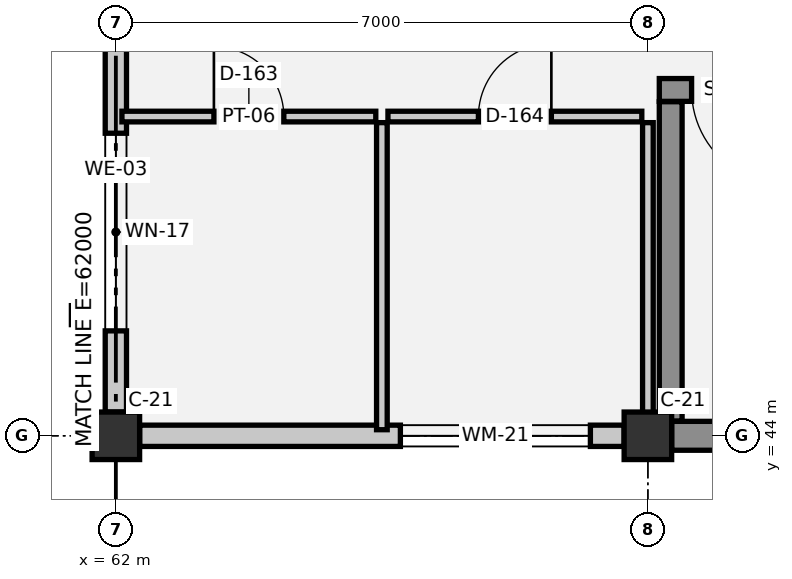
"""IFC4 building model, lengths in metres.
Left out: names, types, materials, properties, quantities, classifications, styles, units other than length and angle.
Written with IfcOpenShell. Run it as: python <this file> out.ifc"""

import sys

from ifc_helpers import new_model, si_unit, direction, frame, frame_2d, origin, origin_2d, place, context, subcontext, project, spatial, rectangle, extrude, element, fill, save


model = new_model("IFC4")
c1 = context("Model", 3, precision=1e-05, world=origin(), true_north=direction((0.0, 1.0)))
c2 = subcontext(c1, "Body", "Model", "MODEL_VIEW")
j1 = project(units=[si_unit("LENGTHUNIT", "METRE"), si_unit("PLANEANGLEUNIT", "RADIAN")], contexts=[c1])
p1 = place(None, origin())
s1 = spatial("IfcSite", under=j1, at=p1, CompositionType="ELEMENT")
p2 = place(p1, origin())
s2 = spatial("IfcBuilding", under=s1, at=p2, CompositionType="ELEMENT")
p3 = place(p2, frame((0.0, 0.0, 22.05)))
s3 = spatial("IfcBuildingStorey", under=s2, at=p3, CompositionType="ELEMENT", Elevation=22.05)
for number, where, z_axis, x_axis in (
    (1, (62.0, 44.0, 0.0), (0.0, 0.0, 1.0), (1.0, 0.0, 0.0)),
    (2, (69.0, 44.0, 0.0), (0.0, 0.0, 1.0), (1.0, 0.0, 0.0)),
):
    element("IfcColumn", number, at=place(p3, frame(where, z_axis=z_axis, x_axis=x_axis)), inside=s3, PredefinedType="COLUMN", context=c2, shape_type="SweptSolid", body=[
        extrude(rectangle(XDim=0.625, YDim=0.625, at=origin_2d()), origin(), (0.0, 0.0, 1.0), 3.75),
    ])
p4 = place(p3, frame((62.0, 44.312, 0.0), z_axis=(0.0, 0.0, 1.0), x_axis=(0.0, 1.0, 0.0)))
e3 = element("IfcWall", 3, at=p4, inside=s3, PredefinedType="SOLIDWALL", context=c2, shape_type="SweptSolid", body=[
    extrude(rectangle(XDim=6.375, YDim=0.28, at=frame_2d((3.188, 0.0))), origin(), (0.0, 0.0, 1.0), 2.56),
])
p5 = place(p4, frame((1.068, 0.0, 1.0)))
e4 = element("IfcOpeningElement", 4, at=p5, cuts=e3, PredefinedType="OPENING", context=c2, shape_type="SweptSolid", body=[
    extrude(rectangle(XDim=2.6, YDim=1.1, at=frame_2d((1.3, 0.55))), frame((0.0, 0.15, 0.0), z_axis=(0.0, -1.0, 0.0), x_axis=(1.0, 0.0, 0.0)), (0.0, 0.0, 1.0), 0.3),
])
p6 = place(p3, frame((76.688, 44.0, 0.0), z_axis=(0.0, 0.0, 1.0), x_axis=(-1.0, 0.0, 0.0)))
e5 = element("IfcWall", 5, at=p6, inside=s3, PredefinedType="STANDARD", context=c2, shape_type="SweptSolid", body=[
    extrude(rectangle(XDim=7.375, YDim=0.38, at=frame_2d((3.688, 0.0))), origin(), (0.0, 0.0, 1.0), 2.56),
])
p7 = place(p3, frame((68.688, 44.0, 0.0), z_axis=(0.0, 0.0, 1.0), x_axis=(-1.0, 0.0, 0.0)))
e6 = element("IfcWall", 6, at=p7, inside=s3, PredefinedType="SOLIDWALL", context=c2, shape_type="SweptSolid", body=[
    extrude(rectangle(XDim=6.375, YDim=0.28, at=frame_2d((3.188, 0.0))), origin(), (0.0, 0.0, 1.0), 2.56),
])
p8 = place(p7, frame((0.444, 0.0, 1.0)))
e7 = element("IfcOpeningElement", 7, at=p8, cuts=e6, PredefinedType="OPENING", context=c2, shape_type="SweptSolid", body=[
    extrude(rectangle(XDim=2.5, YDim=1.3, at=frame_2d((1.25, 0.65))), frame((0.0, 0.15, 0.0), z_axis=(0.0, -1.0, 0.0), x_axis=(1.0, 0.0, 0.0)), (0.0, 0.0, 1.0), 0.3),
])
p9 = place(p3, frame((76.85, 48.55, 0.0), z_axis=(0.0, 0.0, 1.0), x_axis=(-1.0, 0.0, 0.0)))
e8 = element("IfcWall", 8, at=p9, inside=s3, PredefinedType="SHEAR", context=c2, shape_type="SweptSolid", body=[
    extrude(rectangle(XDim=7.7, YDim=0.3, at=frame_2d((3.85, 0.0))), origin(), (0.0, 0.0, 1.0), 3.47),
])
p10 = place(p9, frame((6.025, 0.0, 0.0)))
e9 = element("IfcOpeningElement", 9, at=p10, cuts=e8, PredefinedType="OPENING", context=c2, shape_type="SweptSolid", body=[
    extrude(rectangle(XDim=1.25, YDim=2.15, at=frame_2d((0.625, 1.075))), frame((0.0, 0.16, 0.0), z_axis=(0.0, -1.0, 0.0), x_axis=(1.0, 0.0, 0.0)), (0.0, 0.0, 1.0), 0.32),
])
p11 = place(p3, frame((69.3, 48.395, 0.0), z_axis=(0.0, 0.0, 1.0), x_axis=(0.0, -1.0, 0.0)))
e10 = element("IfcWall", 10, at=p11, inside=s3, PredefinedType="SHEAR", context=c2, shape_type="SweptSolid", body=[
    extrude(rectangle(XDim=4.2, YDim=0.3, at=frame_2d((2.1, 0.0))), origin(), (0.0, 0.0, 1.0), 3.47),
])
p12 = place(p3, frame((62.08, 48.2, 0.0), z_axis=(0.0, 0.0, 1.0), x_axis=(1.0, 0.0, 0.0)))
e11 = element("IfcWall", 11, at=p12, inside=s3, PredefinedType="PLUMBINGWALL", context=c2, shape_type="SweptSolid", body=[
    extrude(rectangle(XDim=3.34, YDim=0.14, at=frame_2d((1.67, 0.0))), origin(), (0.0, 0.0, 1.0), 3.39),
])
p13 = place(p12, frame((1.21, 0.0, 0.0)))
e12 = element("IfcOpeningElement", 12, at=p13, cuts=e11, PredefinedType="OPENING", context=c2, shape_type="SweptSolid", body=[
    extrude(rectangle(XDim=0.92, YDim=2.1, at=frame_2d((0.46, 1.05))), frame((0.0, 0.08, 0.0), z_axis=(0.0, -1.0, 0.0), x_axis=(1.0, 0.0, 0.0)), (0.0, 0.0, 1.0), 0.16),
])
p14 = place(p3, frame((65.58, 48.2, 0.0), z_axis=(0.0, 0.0, 1.0), x_axis=(1.0, 0.0, 0.0)))
e13 = element("IfcWall", 13, at=p14, inside=s3, PredefinedType="PLUMBINGWALL", context=c2, shape_type="SweptSolid", body=[
    extrude(rectangle(XDim=3.34, YDim=0.14, at=frame_2d((1.67, 0.0))), origin(), (0.0, 0.0, 1.0), 3.39),
])
p15 = place(p14, frame((1.19, 0.0, 0.0)))
e14 = element("IfcOpeningElement", 14, at=p15, cuts=e13, PredefinedType="OPENING", context=c2, shape_type="SweptSolid", body=[
    extrude(rectangle(XDim=0.96, YDim=2.1, at=frame_2d((0.48, 1.05))), frame((0.0, 0.08, 0.0), z_axis=(0.0, -1.0, 0.0), x_axis=(1.0, 0.0, 0.0)), (0.0, 0.0, 1.0), 0.16),
])
p16 = place(p3, frame((65.5, 44.08, 0.0), z_axis=(0.0, 0.0, 1.0), x_axis=(0.0, 1.0, 0.0)))
e15 = element("IfcWall", 15, at=p16, inside=s3, PredefinedType="PLUMBINGWALL", context=c2, shape_type="SweptSolid", body=[
    extrude(rectangle(XDim=4.04, YDim=0.14, at=frame_2d((2.02, 0.0))), origin(), (0.0, 0.0, 1.0), 3.39),
])
p17 = place(p3, frame((69.0, 44.08, 0.0), z_axis=(0.0, 0.0, 1.0), x_axis=(0.0, 1.0, 0.0)))
e16 = element("IfcWall", 16, at=p17, inside=s3, PredefinedType="PLUMBINGWALL", context=c2, shape_type="SweptSolid", body=[
    extrude(rectangle(XDim=4.04, YDim=0.14, at=frame_2d((2.02, 0.0))), origin(), (0.0, 0.0, 1.0), 2.88),
])
p18 = place(p5, origin())
e17 = element("IfcWindow", 17, at=p18, inside=s3, PartitioningType="SINGLE_PANEL", PredefinedType="WINDOW", context=c2, shape_type="SweptSolid", body=[
    extrude(rectangle(XDim=2.6, YDim=1.1, at=frame_2d((1.3, 0.55))), frame((0.0, 0.03, 0.0), z_axis=(0.0, -1.0, 0.0), x_axis=(1.0, 0.0, 0.0)), (0.0, 0.0, 1.0), 0.06),
])
fill(e4, e17)
p19 = place(p8, origin())
e18 = element("IfcWindow", 18, at=p19, inside=s3, PartitioningType="SINGLE_PANEL", PredefinedType="WINDOW", context=c2, shape_type="SweptSolid", body=[
    extrude(rectangle(XDim=2.5, YDim=1.3, at=frame_2d((1.25, 0.65))), frame((0.0, 0.03, 0.0), z_axis=(0.0, -1.0, 0.0), x_axis=(1.0, 0.0, 0.0)), (0.0, 0.0, 1.0), 0.06),
])
fill(e7, e18)
p20 = place(p10, origin())
e19 = element("IfcDoor", 19, at=p20, inside=s3, OperationType="SINGLE_SWING_LEFT", PredefinedType="DOOR", context=c2, shape_type="SweptSolid", body=[
    extrude(rectangle(XDim=1.25, YDim=2.15, at=frame_2d((0.625, 1.075))), frame((0.0, 0.025, 0.0), z_axis=(0.0, -1.0, 0.0), x_axis=(1.0, 0.0, 0.0)), (0.0, 0.0, 1.0), 0.05),
])
fill(e9, e19)
p21 = place(p13, origin())
e20 = element("IfcDoor", 20, at=p21, inside=s3, OperationType="SINGLE_SWING_LEFT", PredefinedType="DOOR", context=c2, shape_type="SweptSolid", body=[
    extrude(rectangle(XDim=0.92, YDim=2.1, at=frame_2d((0.46, 1.05))), frame((0.0, 0.025, 0.0), z_axis=(0.0, -1.0, 0.0), x_axis=(1.0, 0.0, 0.0)), (0.0, 0.0, 1.0), 0.05),
])
fill(e12, e20)
p22 = place(p15, origin())
e21 = element("IfcDoor", 21, at=p22, inside=s3, OperationType="SINGLE_SWING_RIGHT", PredefinedType="DOOR", context=c2, shape_type="SweptSolid", body=[
    extrude(rectangle(XDim=0.96, YDim=2.1, at=frame_2d((0.48, 1.05))), frame((0.0, 0.025, 0.0), z_axis=(0.0, -1.0, 0.0), x_axis=(1.0, 0.0, 0.0)), (0.0, 0.0, 1.0), 0.05),
])
fill(e14, e21)
save(model, sys.argv[1])
